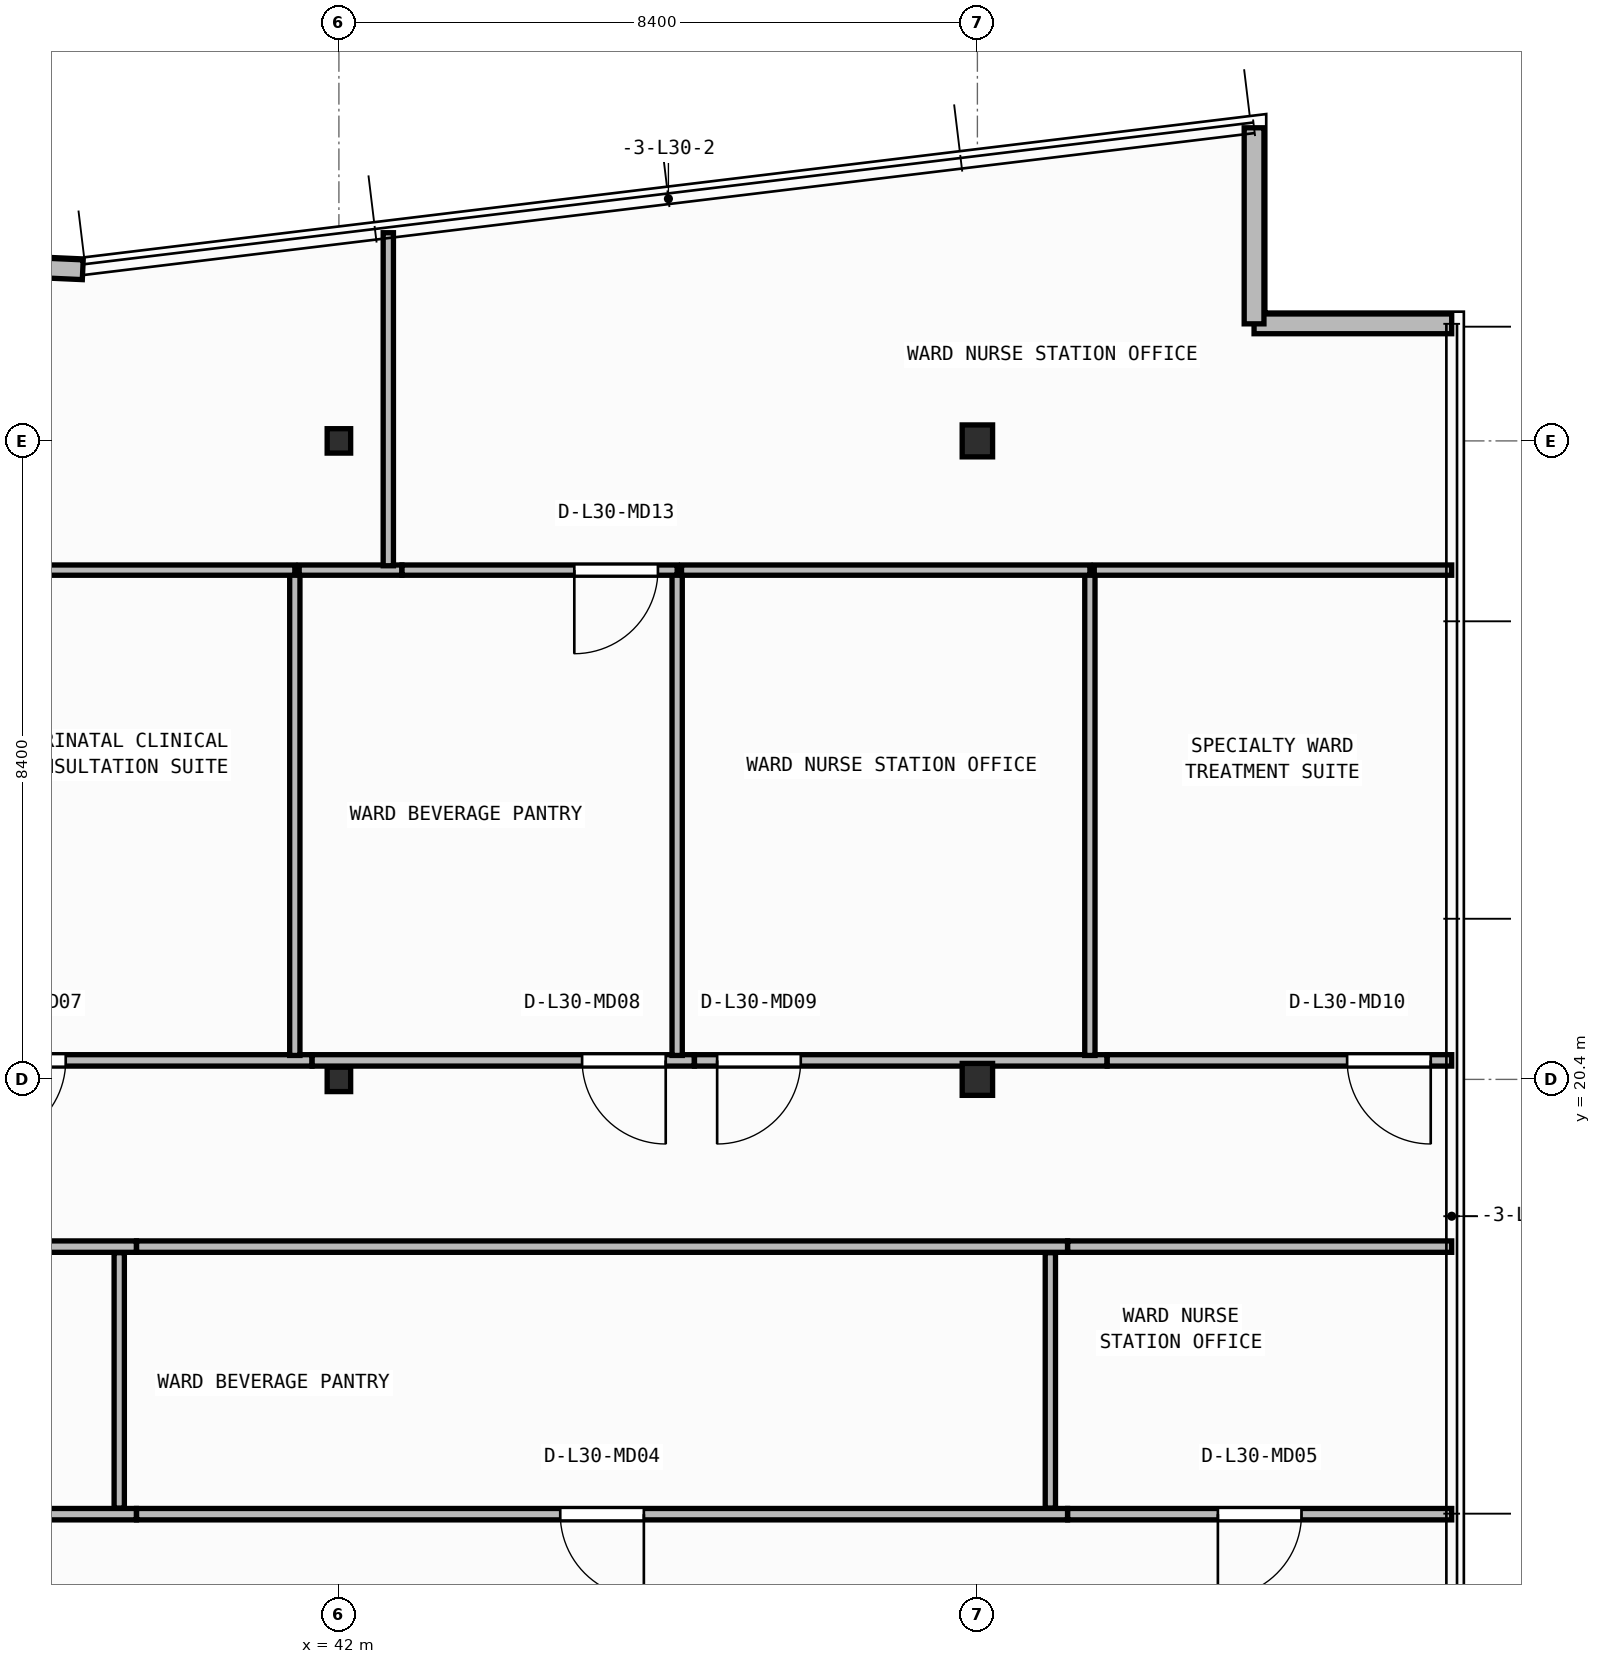
"""IFC4 building model, lengths in metres.
Left out: names, types, materials, properties, quantities, classifications, styles, units other than length and angle.
Written with IfcOpenShell. Run it as: python <this file> out.ifc"""

import sys

from ifc_helpers import new_model, si_unit, direction, frame, frame_2d, origin, origin_2d, place, context, subcontext, project, spatial, rectangle, i_section, extrude, element, fill, save


model = new_model("IFC4")
c1 = context("Model", 3, precision=1e-05, world=origin(), true_north=direction((0.0, 1.0)))
c2 = subcontext(c1, "Body", "Model", "MODEL_VIEW")
j1 = project(units=[si_unit("LENGTHUNIT", "METRE"), si_unit("PLANEANGLEUNIT", "RADIAN")], contexts=[c1])
p1 = place(None, origin())
s1 = spatial("IfcSite", under=j1, at=p1, CompositionType="ELEMENT")
p2 = place(p1, origin())
s2 = spatial("IfcBuilding", under=s1, at=p2, CompositionType="ELEMENT")
p3 = place(p2, frame((0.0, 0.0, 123.1)))
s3 = spatial("IfcBuildingStorey", under=s2, at=p3, CompositionType="ELEMENT", Elevation=123.1)
p4 = place(p3, frame((42.0, 20.4, 0.0), z_axis=(0.0, 0.0, 1.0), x_axis=(1.0, 0.0, 0.0)))
e1 = element("IfcColumn", 1, at=p4, inside=s3, PredefinedType="COLUMN", context=c2, shape_type="SweptSolid", body=[
    extrude(i_section(OverallWidth=0.309, OverallDepth=0.321, WebThickness=0.014, FlangeThickness=0.022, FilletRadius=0.017, at=origin_2d()), origin(), (0.0, 0.0, 1.0), 3.95),
])
p5 = place(p3, frame((50.4, 20.4, 0.0), z_axis=(0.0, 0.0, 1.0), x_axis=(1.0, 0.0, 0.0)))
e2 = element("IfcColumn", 2, at=p5, inside=s3, PredefinedType="COLUMN", context=c2, shape_type="SweptSolid", body=[
    extrude(i_section(OverallWidth=0.4, OverallDepth=0.42, WebThickness=0.025, FlangeThickness=0.04, at=origin_2d()), origin(), (0.0, 0.0, 1.0), 3.95),
])
p6 = place(p3, frame((42.0, 28.8, 0.0), z_axis=(0.0, 0.0, 1.0), x_axis=(1.0, 0.0, 0.0)))
e3 = element("IfcColumn", 3, at=p6, inside=s3, PredefinedType="COLUMN", context=c2, shape_type="SweptSolid", body=[
    extrude(i_section(OverallWidth=0.309, OverallDepth=0.321, WebThickness=0.014, FlangeThickness=0.022, FilletRadius=0.017, at=origin_2d()), origin(), (0.0, 0.0, 1.0), 3.95),
])
p7 = place(p3, frame((50.4, 28.8, 0.0), z_axis=(0.0, 0.0, 1.0), x_axis=(1.0, 0.0, 0.0)))
e4 = element("IfcColumn", 4, at=p7, inside=s3, PredefinedType="COLUMN", context=c2, shape_type="SweptSolid", body=[
    extrude(i_section(OverallWidth=0.4, OverallDepth=0.42, WebThickness=0.025, FlangeThickness=0.04, at=origin_2d()), origin(), (0.0, 0.0, 1.0), 3.95),
])
p8 = place(p3, frame((56.64, 30.34, 0.0), z_axis=(0.0, 0.0, 1.0), x_axis=(-1.0, 0.0, 0.0)))
e5 = element("IfcWall", 5, at=p8, inside=s3, PredefinedType="STANDARD", context=c2, shape_type="SweptSolid", body=[
    extrude(rectangle(XDim=2.6, YDim=0.26, at=frame_2d((1.3, 0.0))), origin(), (0.0, 0.0, 1.0), 3.71),
])
p9 = place(p3, frame((54.04, 30.34, 0.0), z_axis=(0.0, 0.0, 1.0), x_axis=(0.0, 1.0, 0.0)))
e6 = element("IfcWall", 6, at=p9, inside=s3, PredefinedType="STANDARD", context=c2, shape_type="SweptSolid", body=[
    extrude(rectangle(XDim=2.579, YDim=0.26, at=frame_2d((1.29, 0.0))), origin(), (0.0, 0.0, 1.0), 3.71),
])
p10 = place(p3, frame((38.63, 31.052, 0.0), z_axis=(0.0, 0.0, 1.0), x_axis=(-0.998996592956, 0.044786239663, 0.0)))
e7 = element("IfcWall", 7, at=p10, inside=s3, PredefinedType="STANDARD", context=c2, shape_type="SweptSolid", body=[
    extrude(rectangle(XDim=14.827, YDim=0.26, at=frame_2d((7.414, 0.0))), origin(), (0.0, 0.0, 1.0), 3.71),
])
p11 = place(p10, frame((6.214, 0.0, 0.9)))
e8 = element("IfcOpeningElement", 8, at=p11, cuts=e7, PredefinedType="OPENING", context=c2, shape_type="SweptSolid", body=[
    extrude(rectangle(XDim=2.4, YDim=1.65, at=frame_2d((1.2, 0.825))), frame((0.0, 0.14, 0.0), z_axis=(0.0, -1.0, 0.0), x_axis=(1.0, 0.0, 0.0)), (0.0, 0.0, 1.0), 0.28),
])
p12 = place(p3, frame((39.336, 14.68, 0.0), z_axis=(0.0, 0.0, 1.0), x_axis=(-1.0, 0.0, 0.0)))
e9 = element("IfcWall", 9, at=p12, inside=s3, PredefinedType="PARTITIONING", context=c2, shape_type="SweptSolid", body=[
    extrude(rectangle(XDim=9.528, YDim=0.15, at=frame_2d((4.764, 0.0))), origin(), (0.0, 0.0, 1.0), 3.71),
])
p13 = place(p12, frame((4.214, 0.0, 0.0)))
e10 = element("IfcOpeningElement", 10, at=p13, cuts=e9, PredefinedType="OPENING", context=c2, shape_type="SweptSolid", body=[
    extrude(rectangle(XDim=1.1, YDim=2.1, at=frame_2d((0.55, 1.05))), frame((0.0, 0.085, 0.0), z_axis=(0.0, -1.0, 0.0), x_axis=(1.0, 0.0, 0.0)), (0.0, 0.0, 1.0), 0.17),
])
p14 = place(p3, frame((51.586, 14.68, 0.0), z_axis=(0.0, 0.0, 1.0), x_axis=(-1.0, 0.0, 0.0)))
e11 = element("IfcWall", 11, at=p14, inside=s3, PredefinedType="PARTITIONING", context=c2, shape_type="SweptSolid", body=[
    extrude(rectangle(XDim=12.248, YDim=0.15, at=frame_2d((6.124, 0.0))), origin(), (0.0, 0.0, 1.0), 3.71),
])
p15 = place(p14, frame((5.574, 0.0, 0.0)))
e12 = element("IfcOpeningElement", 12, at=p15, cuts=e11, PredefinedType="OPENING", context=c2, shape_type="SweptSolid", body=[
    extrude(rectangle(XDim=1.1, YDim=2.1, at=frame_2d((0.55, 1.05))), frame((0.0, 0.085, 0.0), z_axis=(0.0, -1.0, 0.0), x_axis=(1.0, 0.0, 0.0)), (0.0, 0.0, 1.0), 0.17),
])
p16 = place(p3, frame((56.64, 14.68, 0.0), z_axis=(0.0, 0.0, 1.0), x_axis=(-1.0, 0.0, 0.0)))
e13 = element("IfcWall", 13, at=p16, inside=s3, PredefinedType="PARTITIONING", context=c2, shape_type="SweptSolid", body=[
    extrude(rectangle(XDim=5.052, YDim=0.15, at=frame_2d((2.526, 0.0))), origin(), (0.0, 0.0, 1.0), 3.71),
])
p17 = place(p16, frame((1.976, 0.0, 0.0)))
e14 = element("IfcOpeningElement", 14, at=p17, cuts=e13, PredefinedType="OPENING", context=c2, shape_type="SweptSolid", body=[
    extrude(rectangle(XDim=1.1, YDim=2.1, at=frame_2d((0.55, 1.05))), frame((0.0, 0.085, 0.0), z_axis=(0.0, -1.0, 0.0), x_axis=(1.0, 0.0, 0.0)), (0.0, 0.0, 1.0), 0.17),
])
p18 = place(p3, frame((29.808, 18.2, 0.0), z_axis=(0.0, 0.0, 1.0), x_axis=(1.0, 0.0, 0.0)))
e15 = element("IfcWall", 15, at=p18, inside=s3, PredefinedType="PARTITIONING", context=c2, shape_type="SweptSolid", body=[
    extrude(rectangle(XDim=9.528, YDim=0.15, at=frame_2d((4.764, 0.0))), origin(), (0.0, 0.0, 1.0), 3.71),
])
p19 = place(p3, frame((39.338, 18.2, 0.0), z_axis=(0.0, 0.0, 1.0), x_axis=(1.0, 0.0, 0.0)))
e16 = element("IfcWall", 16, at=p19, inside=s3, PredefinedType="PARTITIONING", context=c2, shape_type="SweptSolid", body=[
    extrude(rectangle(XDim=12.248, YDim=0.15, at=frame_2d((6.124, 0.0))), origin(), (0.0, 0.0, 1.0), 3.71),
])
p20 = place(p3, frame((51.588, 18.2, 0.0), z_axis=(0.0, 0.0, 1.0), x_axis=(1.0, 0.0, 0.0)))
e17 = element("IfcWall", 17, at=p20, inside=s3, PredefinedType="PARTITIONING", context=c2, shape_type="SweptSolid", body=[
    extrude(rectangle(XDim=5.052, YDim=0.15, at=frame_2d((2.526, 0.0))), origin(), (0.0, 0.0, 1.0), 3.71),
])
p21 = place(p3, frame((41.646, 20.65, 0.0), z_axis=(0.0, 0.0, 1.0), x_axis=(-1.0, 0.0, 0.0)))
e18 = element("IfcWall", 18, at=p21, inside=s3, PredefinedType="PARTITIONING", context=c2, shape_type="SweptSolid", body=[
    extrude(rectangle(XDim=4.618, YDim=0.15, at=frame_2d((2.309, 0.0))), origin(), (0.0, 0.0, 1.0), 3.083),
])
p22 = place(p21, frame((3.24, 0.0, 0.0)))
e19 = element("IfcOpeningElement", 19, at=p22, cuts=e18, PredefinedType="OPENING", context=c2, shape_type="SweptSolid", body=[
    extrude(rectangle(XDim=1.1, YDim=2.1, at=frame_2d((0.55, 1.05))), frame((0.0, 0.085, 0.0), z_axis=(0.0, -1.0, 0.0), x_axis=(1.0, 0.0, 0.0)), (0.0, 0.0, 1.0), 0.17),
])
p23 = place(p3, frame((46.676, 20.65, 0.0), z_axis=(0.0, 0.0, 1.0), x_axis=(-1.0, 0.0, 0.0)))
e20 = element("IfcWall", 20, at=p23, inside=s3, PredefinedType="PARTITIONING", context=c2, shape_type="SweptSolid", body=[
    extrude(rectangle(XDim=5.028, YDim=0.15, at=frame_2d((2.514, 0.0))), origin(), (0.0, 0.0, 1.0), 3.083),
])
p24 = place(p23, frame((0.376, 0.0, 0.0)))
e21 = element("IfcOpeningElement", 21, at=p24, cuts=e20, PredefinedType="OPENING", context=c2, shape_type="SweptSolid", body=[
    extrude(rectangle(XDim=1.1, YDim=2.1, at=frame_2d((0.55, 1.05))), frame((0.0, 0.085, 0.0), z_axis=(0.0, -1.0, 0.0), x_axis=(1.0, 0.0, 0.0)), (0.0, 0.0, 1.0), 0.17),
])
p25 = place(p3, frame((52.106, 20.65, 0.0), z_axis=(0.0, 0.0, 1.0), x_axis=(-1.0, 0.0, 0.0)))
e22 = element("IfcWall", 22, at=p25, inside=s3, PredefinedType="PARTITIONING", context=c2, shape_type="SweptSolid", body=[
    extrude(rectangle(XDim=5.428, YDim=0.15, at=frame_2d((2.714, 0.0))), origin(), (0.0, 0.0, 1.0), 3.083),
])
p26 = place(p25, frame((4.03, 0.0, 0.0)))
e23 = element("IfcOpeningElement", 23, at=p26, cuts=e22, PredefinedType="OPENING", context=c2, shape_type="SweptSolid", body=[
    extrude(rectangle(XDim=1.1, YDim=2.1, at=frame_2d((0.55, 1.05))), frame((0.0, 0.085, 0.0), z_axis=(0.0, -1.0, 0.0), x_axis=(1.0, 0.0, 0.0)), (0.0, 0.0, 1.0), 0.17),
])
p27 = place(p3, frame((56.64, 20.65, 0.0), z_axis=(0.0, 0.0, 1.0), x_axis=(-1.0, 0.0, 0.0)))
e24 = element("IfcWall", 24, at=p27, inside=s3, PredefinedType="PARTITIONING", context=c2, shape_type="SweptSolid", body=[
    extrude(rectangle(XDim=4.532, YDim=0.15, at=frame_2d((2.266, 0.0))), origin(), (0.0, 0.0, 1.0), 3.71),
])
p28 = place(p27, frame((0.276, 0.0, 0.0)))
e25 = element("IfcOpeningElement", 25, at=p28, cuts=e24, PredefinedType="OPENING", context=c2, shape_type="SweptSolid", body=[
    extrude(rectangle(XDim=1.1, YDim=2.1, at=frame_2d((0.55, 1.05))), frame((0.0, 0.085, 0.0), z_axis=(0.0, -1.0, 0.0), x_axis=(1.0, 0.0, 0.0)), (0.0, 0.0, 1.0), 0.17),
])
for number, where, z_axis, x_axis in (
    (26, (39.11, 14.76, 0.0), (0.0, 0.0, 1.0), (0.0, 1.0, 0.0)),
    (27, (51.36, 14.76, 0.0), (0.0, 0.0, 1.0), (0.0, 1.0, 0.0)),
):
    element("IfcWall", number, at=place(p3, frame(where, z_axis=z_axis, x_axis=x_axis)), inside=s3, PredefinedType="PARTITIONING", context=c2, shape_type="SweptSolid", body=[
        extrude(rectangle(XDim=3.36, YDim=0.135, at=frame_2d((1.68, 0.0))), origin(), (0.0, 0.0, 1.0), 3.71),
    ])
p29 = place(p3, frame((41.42, 20.715, 0.0), z_axis=(0.0, 0.0, 1.0), x_axis=(0.0, 1.0, 0.0)))
e28 = element("IfcWall", 28, at=p29, inside=s3, PredefinedType="PARTITIONING", context=c2, shape_type="SweptSolid", body=[
    extrude(rectangle(XDim=6.385, YDim=0.135, at=frame_2d((3.192, 0.0))), origin(), (0.0, 0.0, 1.0), 3.71),
])
p30 = place(p3, frame((41.42, 27.1, 0.0), z_axis=(0.0, 0.0, 1.0), x_axis=(-1.0, 0.0, 0.0)))
e29 = element("IfcWall", 29, at=p30, inside=s3, PredefinedType="PARTITIONING", context=c2, shape_type="SweptSolid", body=[
    extrude(rectangle(XDim=4.562, YDim=0.135, at=frame_2d((2.281, 0.0))), origin(), (0.0, 0.0, 1.0), 3.71),
])
p31 = place(p3, frame((46.45, 20.715, 0.0), z_axis=(0.0, 0.0, 1.0), x_axis=(0.0, 1.0, 0.0)))
e30 = element("IfcWall", 30, at=p31, inside=s3, PredefinedType="PARTITIONING", context=c2, shape_type="SweptSolid", body=[
    extrude(rectangle(XDim=6.385, YDim=0.135, at=frame_2d((3.192, 0.0))), origin(), (0.0, 0.0, 1.0), 3.71),
])
p32 = place(p3, frame((42.829, 27.1, 0.0), z_axis=(0.0, 0.0, 1.0), x_axis=(-1.0, 0.0, 0.0)))
e31 = element("IfcWall", 31, at=p32, inside=s3, PredefinedType="PARTITIONING", context=c2, shape_type="SweptSolid", body=[
    extrude(rectangle(XDim=1.351, YDim=0.135, at=frame_2d((0.676, 0.0))), origin(), (0.0, 0.0, 1.0), 3.71),
])
p33 = place(p3, frame((46.45, 27.1, 0.0), z_axis=(0.0, 0.0, 1.0), x_axis=(-1.0, 0.0, 0.0)))
e32 = element("IfcWall", 32, at=p33, inside=s3, PredefinedType="PARTITIONING", context=c2, shape_type="SweptSolid", body=[
    extrude(rectangle(XDim=3.619, YDim=0.135, at=frame_2d((1.81, 0.0))), origin(), (0.0, 0.0, 1.0), 3.71),
])
p34 = place(p33, frame((0.253, 0.0, 0.0)))
e33 = element("IfcOpeningElement", 33, at=p34, cuts=e32, PredefinedType="OPENING", context=c2, shape_type="SweptSolid", body=[
    extrude(rectangle(XDim=1.1, YDim=2.1, at=frame_2d((0.55, 1.05))), frame((0.0, 0.077, 0.0), z_axis=(0.0, -1.0, 0.0), x_axis=(1.0, 0.0, 0.0)), (0.0, 0.0, 1.0), 0.155),
])
p35 = place(p3, frame((51.88, 20.715, 0.0), z_axis=(0.0, 0.0, 1.0), x_axis=(0.0, 1.0, 0.0)))
e34 = element("IfcWall", 34, at=p35, inside=s3, PredefinedType="PARTITIONING", context=c2, shape_type="SweptSolid", body=[
    extrude(rectangle(XDim=6.385, YDim=0.135, at=frame_2d((3.192, 0.0))), origin(), (0.0, 0.0, 1.0), 3.71),
])
p36 = place(p3, frame((51.88, 27.1, 0.0), z_axis=(0.0, 0.0, 1.0), x_axis=(-1.0, 0.0, 0.0)))
e35 = element("IfcWall", 35, at=p36, inside=s3, PredefinedType="PARTITIONING", context=c2, shape_type="SweptSolid", body=[
    extrude(rectangle(XDim=5.372, YDim=0.135, at=frame_2d((2.686, 0.0))), origin(), (0.0, 0.0, 1.0), 3.71),
])
p37 = place(p3, frame((56.64, 27.1, 0.0), z_axis=(0.0, 0.0, 1.0), x_axis=(-1.0, 0.0, 0.0)))
e36 = element("IfcWall", 36, at=p37, inside=s3, PredefinedType="PARTITIONING", context=c2, shape_type="SweptSolid", body=[
    extrude(rectangle(XDim=4.702, YDim=0.135, at=frame_2d((2.351, 0.0))), origin(), (0.0, 0.0, 1.0), 3.71),
])
p38 = place(p3, frame((42.65, 27.157, 0.0), z_axis=(0.0, 0.0, 1.0), x_axis=(0.0, 1.0, 0.0)))
e37 = element("IfcWall", 37, at=p38, inside=s3, PredefinedType="PARTITIONING", context=c2, shape_type="SweptSolid", body=[
    extrude(rectangle(XDim=4.381, YDim=0.135, at=frame_2d((2.191, 0.0))), origin(), (0.0, 0.0, 1.0), 3.71),
])
p39 = place(p15, origin())
e38 = element("IfcDoor", 38, at=p39, inside=s3, OperationType="SINGLE_SWING_LEFT", PredefinedType="DOOR", context=c2, shape_type="SweptSolid", body=[
    extrude(rectangle(XDim=1.1, YDim=2.1, at=frame_2d((0.55, 1.05))), frame((0.0, 0.025, 0.0), z_axis=(0.0, -1.0, 0.0), x_axis=(1.0, 0.0, 0.0)), (0.0, 0.0, 1.0), 0.05),
])
fill(e12, e38)
p40 = place(p17, origin())
e39 = element("IfcDoor", 39, at=p40, inside=s3, OperationType="SINGLE_SWING_RIGHT", PredefinedType="DOOR", context=c2, shape_type="SweptSolid", body=[
    extrude(rectangle(XDim=1.1, YDim=2.1, at=frame_2d((0.55, 1.05))), frame((0.0, 0.025, 0.0), z_axis=(0.0, -1.0, 0.0), x_axis=(1.0, 0.0, 0.0)), (0.0, 0.0, 1.0), 0.05),
])
fill(e14, e39)
p41 = place(p22, origin())
e40 = element("IfcDoor", 40, at=p41, inside=s3, OperationType="SINGLE_SWING_RIGHT", PredefinedType="DOOR", context=c2, shape_type="SweptSolid", body=[
    extrude(rectangle(XDim=1.1, YDim=2.1, at=frame_2d((0.55, 1.05))), frame((0.0, 0.025, 0.0), z_axis=(0.0, -1.0, 0.0), x_axis=(1.0, 0.0, 0.0)), (0.0, 0.0, 1.0), 0.05),
])
fill(e19, e40)
p42 = place(p24, origin())
e41 = element("IfcDoor", 41, at=p42, inside=s3, OperationType="SINGLE_SWING_LEFT", PredefinedType="DOOR", context=c2, shape_type="SweptSolid", body=[
    extrude(rectangle(XDim=1.1, YDim=2.1, at=frame_2d((0.55, 1.05))), frame((0.0, 0.025, 0.0), z_axis=(0.0, -1.0, 0.0), x_axis=(1.0, 0.0, 0.0)), (0.0, 0.0, 1.0), 0.05),
])
fill(e21, e41)
p43 = place(p26, origin())
e42 = element("IfcDoor", 42, at=p43, inside=s3, OperationType="SINGLE_SWING_RIGHT", PredefinedType="DOOR", context=c2, shape_type="SweptSolid", body=[
    extrude(rectangle(XDim=1.1, YDim=2.1, at=frame_2d((0.55, 1.05))), frame((0.0, 0.025, 0.0), z_axis=(0.0, -1.0, 0.0), x_axis=(1.0, 0.0, 0.0)), (0.0, 0.0, 1.0), 0.05),
])
fill(e23, e42)
p44 = place(p28, origin())
e43 = element("IfcDoor", 43, at=p44, inside=s3, OperationType="SINGLE_SWING_LEFT", PredefinedType="DOOR", context=c2, shape_type="SweptSolid", body=[
    extrude(rectangle(XDim=1.1, YDim=2.1, at=frame_2d((0.55, 1.05))), frame((0.0, 0.025, 0.0), z_axis=(0.0, -1.0, 0.0), x_axis=(1.0, 0.0, 0.0)), (0.0, 0.0, 1.0), 0.05),
])
fill(e25, e43)
p45 = place(p34, origin())
e44 = element("IfcDoor", 44, at=p45, inside=s3, OperationType="SINGLE_SWING_RIGHT", PredefinedType="DOOR", context=c2, shape_type="SweptSolid", body=[
    extrude(rectangle(XDim=1.1, YDim=2.1, at=frame_2d((0.55, 1.05))), frame((0.0, 0.025, 0.0), z_axis=(0.0, -1.0, 0.0), x_axis=(1.0, 0.0, 0.0)), (0.0, 0.0, 1.0), 0.05),
])
fill(e33, e44)
save(model, sys.argv[1])
